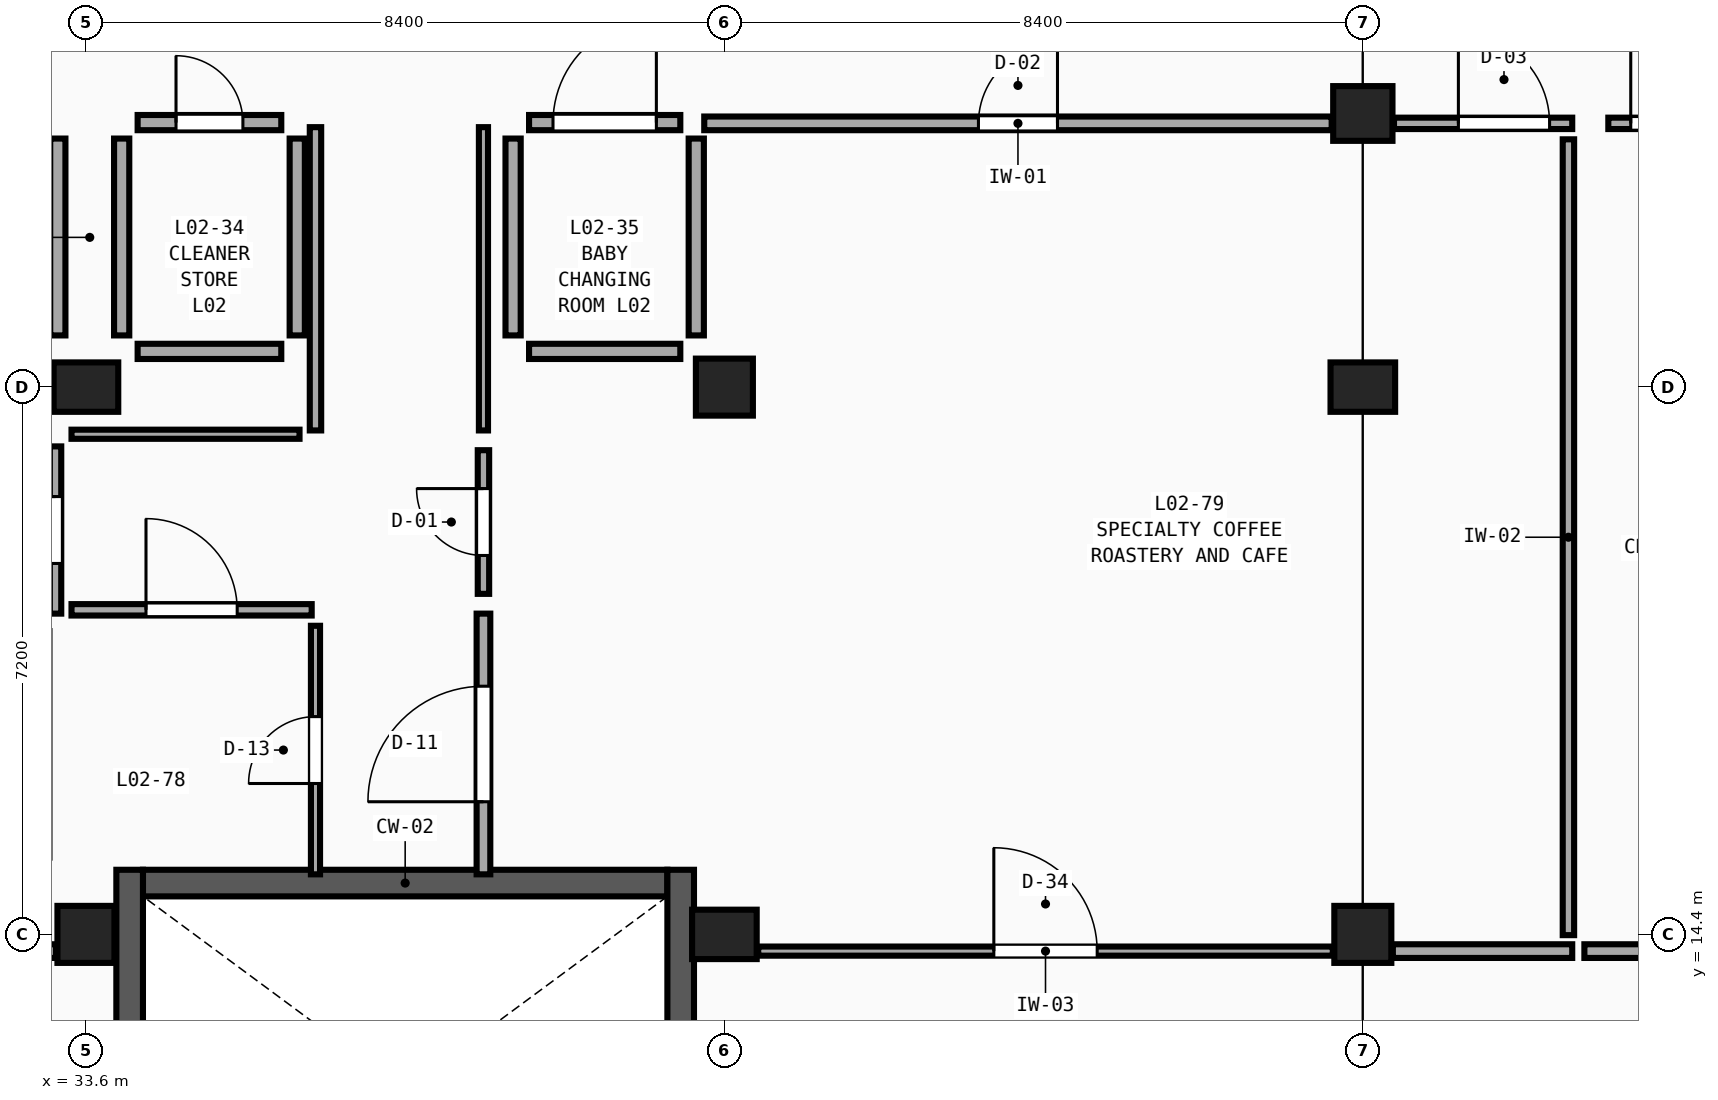
"""IFC4 building model, lengths in metres.
Left out: names, types, materials, properties, quantities, classifications, styles, units other than length and angle.
Written with IfcOpenShell. Run it as: python <this file> out.ifc"""

import sys

from ifc_helpers import new_model, si_unit, direction, frame, frame_2d, origin, origin_2d, place, context, subcontext, project, spatial, rectangle, extrude, element, fill, save


model = new_model("IFC4")
c1 = context("Model", 3, precision=1e-05, world=origin(), true_north=direction((0.0, 1.0)))
c2 = subcontext(c1, "Body", "Model", "MODEL_VIEW")
j1 = project(units=[si_unit("LENGTHUNIT", "METRE"), si_unit("PLANEANGLEUNIT", "RADIAN")], contexts=[c1])
p1 = place(None, origin())
s1 = spatial("IfcSite", under=j1, at=p1, CompositionType="ELEMENT")
p2 = place(p1, origin())
s2 = spatial("IfcBuilding", under=s1, at=p2, CompositionType="ELEMENT")
p3 = place(p2, frame((0.0, 0.0, 9.9)))
s3 = spatial("IfcBuildingStorey", under=s2, at=p3, CompositionType="ELEMENT", Elevation=9.9)
p4 = place(p3, frame((33.6, 14.4, 0.0), z_axis=(0.0, 0.0, 1.0), x_axis=(1.0, 0.0, 0.0)))
e1 = element("IfcColumn", 1, at=p4, inside=s3, PredefinedType="COLUMN", context=c2, shape_type="SweptSolid", body=[
    extrude(rectangle(XDim=0.75, YDim=0.75, at=origin_2d()), origin(), (0.0, 0.0, 1.0), 4.5),
])
for number, where, z_axis, x_axis in (
    (2, (33.6, 21.6, 0.0), (0.0, 0.0, 1.0), (1.0, 0.0, 0.0)),
    (3, (42.0, 14.4, 0.0), (0.0, 0.0, 1.0), (1.0, 0.0, 0.0)),
):
    element("IfcColumn", number, at=place(p3, frame(where, z_axis=z_axis, x_axis=x_axis)), inside=s3, PredefinedType="COLUMN", context=c2, shape_type="SweptSolid", body=[
        extrude(rectangle(XDim=0.85, YDim=0.65, at=origin_2d()), origin(), (0.0, 0.0, 1.0), 4.5),
    ])
for number, where, z_axis, x_axis in (
    (4, (42.0, 21.6, 0.0), (0.0, 0.0, 1.0), (1.0, 0.0, 0.0)),
    (5, (50.4, 14.4, 0.0), (0.0, 0.0, 1.0), (1.0, 0.0, 0.0)),
):
    element("IfcColumn", number, at=place(p3, frame(where, z_axis=z_axis, x_axis=x_axis)), inside=s3, PredefinedType="COLUMN", context=c2, shape_type="SweptSolid", body=[
        extrude(rectangle(XDim=0.75, YDim=0.75, at=origin_2d()), origin(), (0.0, 0.0, 1.0), 4.5),
    ])
p5 = place(p3, frame((50.4, 21.6, 0.0), z_axis=(0.0, 0.0, 1.0), x_axis=(1.0, 0.0, 0.0)))
e6 = element("IfcColumn", 6, at=p5, inside=s3, PredefinedType="COLUMN", context=c2, shape_type="SweptSolid", body=[
    extrude(rectangle(XDim=0.85, YDim=0.65, at=origin_2d()), origin(), (0.0, 0.0, 1.0), 4.5),
])
p6 = place(p3, frame((50.4, 25.2, 0.0), z_axis=(0.0, 0.0, 1.0), x_axis=(1.0, 0.0, 0.0)))
e7 = element("IfcColumn", 7, at=p6, inside=s3, PredefinedType="PILASTER", context=c2, shape_type="SweptSolid", body=[
    extrude(rectangle(XDim=0.78, YDim=0.72, at=origin_2d()), origin(), (0.0, 0.0, 1.0), 4.5),
])
p7 = place(p3, frame((34.35, 15.075, 0.0), z_axis=(0.0, 0.0, 1.0), x_axis=(1.0, 0.0, 0.0)))
e8 = element("IfcWall", 8, at=p7, inside=s3, PredefinedType="SHEAR", context=c2, shape_type="SweptSolid", body=[
    extrude(rectangle(XDim=6.9, YDim=0.35, at=frame_2d((3.45, 0.0))), origin(), (0.0, 0.0, 1.0), 4.5),
])
for number, where, z_axis, x_axis in (
    (9, (34.175, 15.25, 0.0), (0.0, 0.0, 1.0), (0.0, -1.0, 0.0)),
    (10, (41.425, 7.3, 0.0), (0.0, 0.0, 1.0), (0.0, 1.0, 0.0)),
):
    element("IfcWall", number, at=place(p3, frame(where, z_axis=z_axis, x_axis=x_axis)), inside=s3, PredefinedType="SHEAR", context=c2, shape_type="SweptSolid", body=[
        extrude(rectangle(XDim=7.95, YDim=0.35, at=frame_2d((3.975, 0.0))), origin(), (0.0, 0.0, 1.0), 4.5),
    ])
p8 = place(p3, frame((25.645, 14.18, 0.0), z_axis=(0.0, 0.0, 1.0), x_axis=(1.0, 0.0, 0.0)))
e11 = element("IfcWall", 11, at=p8, inside=s3, PredefinedType="PARTITIONING", context=c2, shape_type="SweptSolid", body=[
    extrude(rectangle(XDim=7.56, YDim=0.18, at=frame_2d((3.78, 0.0))), origin(), (0.0, 0.0, 1.0), 3.73),
])
p9 = place(p8, frame((3.26, 0.0, 0.0)))
e12 = element("IfcOpeningElement", 12, at=p9, cuts=e11, PredefinedType="OPENING", context=c2, shape_type="SweptSolid", body=[
    extrude(rectangle(XDim=1.04, YDim=2.37, at=frame_2d((0.52, 1.185))), frame((0.0, 0.11, 0.0), z_axis=(0.0, -1.0, 0.0), x_axis=(1.0, 0.0, 0.0)), (0.0, 0.0, 1.0), 0.22),
])
p10 = place(p3, frame((42.445, 14.18, 0.0), z_axis=(0.0, 0.0, 1.0), x_axis=(1.0, 0.0, 0.0)))
e13 = element("IfcWall", 13, at=p10, inside=s3, PredefinedType="PARTITIONING", context=c2, shape_type="SweptSolid", body=[
    extrude(rectangle(XDim=7.56, YDim=0.12, at=frame_2d((3.78, 0.0))), origin(), (0.0, 0.0, 1.0), 3.73),
])
p11 = place(p10, frame((3.1, 0.0, 0.0)))
e14 = element("IfcOpeningElement", 14, at=p11, cuts=e13, PredefinedType="OPENING", context=c2, shape_type="SweptSolid", body=[
    extrude(rectangle(XDim=1.36, YDim=2.45, at=frame_2d((0.68, 1.225))), frame((0.0, 0.08, 0.0), z_axis=(0.0, -1.0, 0.0), x_axis=(1.0, 0.0, 0.0)), (0.0, 0.0, 1.0), 0.16),
])
p12 = place(p3, frame((50.795, 14.18, 0.0), z_axis=(0.0, 0.0, 1.0), x_axis=(1.0, 0.0, 0.0)))
e15 = element("IfcWall", 15, at=p12, inside=s3, PredefinedType="PARTITIONING", context=c2, shape_type="SweptSolid", body=[
    extrude(rectangle(XDim=2.36, YDim=0.18, at=frame_2d((1.18, 0.0))), origin(), (0.0, 0.0, 1.0), 3.73),
])
p13 = place(p3, frame((41.735, 25.07, 0.0), z_axis=(0.0, 0.0, 1.0), x_axis=(1.0, 0.0, 0.0)))
e16 = element("IfcWall", 16, at=p13, inside=s3, PredefinedType="PARTITIONING", context=c2, shape_type="SweptSolid", body=[
    extrude(rectangle(XDim=8.255, YDim=0.18, at=frame_2d((4.127, 0.0))), origin(), (0.0, 0.0, 1.0), 4.18),
])
p14 = place(p13, frame((3.607, 0.0, 0.0)))
e17 = element("IfcOpeningElement", 17, at=p14, cuts=e16, PredefinedType="OPENING", context=c2, shape_type="SweptSolid", body=[
    extrude(rectangle(XDim=1.04, YDim=2.05, at=frame_2d((0.52, 1.025))), frame((0.0, 0.11, 0.0), z_axis=(0.0, -1.0, 0.0), x_axis=(1.0, 0.0, 0.0)), (0.0, 0.0, 1.0), 0.22),
])
p15 = place(p3, frame((50.81, 25.07, 0.0), z_axis=(0.0, 0.0, 1.0), x_axis=(1.0, 0.0, 0.0)))
e18 = element("IfcWall", 18, at=p15, inside=s3, PredefinedType="PARTITIONING", context=c2, shape_type="SweptSolid", body=[
    extrude(rectangle(XDim=2.345, YDim=0.15, at=frame_2d((1.172, 0.0))), origin(), (0.0, 0.0, 1.0), 4.18),
])
p16 = place(p15, frame((0.847, 0.0, 0.0)))
e19 = element("IfcOpeningElement", 19, at=p16, cuts=e18, PredefinedType="OPENING", context=c2, shape_type="SweptSolid", body=[
    extrude(rectangle(XDim=1.2, YDim=2.05, at=frame_2d((0.6, 1.025))), frame((0.0, 0.095, 0.0), z_axis=(0.0, -1.0, 0.0), x_axis=(1.0, 0.0, 0.0)), (0.0, 0.0, 1.0), 0.19),
])
p17 = place(p3, frame((53.315, 14.18, 0.0), z_axis=(0.0, 0.0, 1.0), x_axis=(1.0, 0.0, 0.0)))
e20 = element("IfcWall", 20, at=p17, inside=s3, PredefinedType="PARTITIONING", context=c2, shape_type="SweptSolid", body=[
    extrude(rectangle(XDim=5.09, YDim=0.18, at=frame_2d((2.545, 0.0))), origin(), (0.0, 0.0, 1.0), 3.73),
])
p18 = place(p17, frame((1.785, 0.0, 0.0)))
e21 = element("IfcOpeningElement", 21, at=p18, cuts=e20, PredefinedType="OPENING", context=c2, shape_type="SweptSolid", body=[
    extrude(rectangle(XDim=1.52, YDim=2.45, at=frame_2d((0.76, 1.225))), frame((0.0, 0.11, 0.0), z_axis=(0.0, -1.0, 0.0), x_axis=(1.0, 0.0, 0.0)), (0.0, 0.0, 1.0), 0.22),
])
p19 = place(p3, frame((36.62, 21.03, 0.0), z_axis=(0.0, 0.0, 1.0), x_axis=(0.0, 1.0, 0.0)))
e22 = element("IfcWall", 22, at=p19, inside=s3, PredefinedType="PARTITIONING", context=c2, shape_type="SweptSolid", body=[
    extrude(rectangle(XDim=3.99, YDim=0.15, at=frame_2d((1.995, 0.0))), origin(), (0.0, 0.0, 1.0), 4.18),
])
p20 = place(p3, frame((38.83, 21.03, 0.0), z_axis=(0.0, 0.0, 1.0), x_axis=(0.0, 1.0, 0.0)))
e23 = element("IfcWall", 23, at=p20, inside=s3, PredefinedType="PARTITIONING", context=c2, shape_type="SweptSolid", body=[
    extrude(rectangle(XDim=3.99, YDim=0.12, at=frame_2d((1.995, 0.0))), origin(), (0.0, 0.0, 1.0), 4.18),
])
p21 = place(p3, frame((38.83, 15.19, 0.0), z_axis=(0.0, 0.0, 1.0), x_axis=(0.0, 1.0, 0.0)))
e24 = element("IfcWall", 24, at=p21, inside=s3, PredefinedType="PARTITIONING", context=c2, shape_type="SweptSolid", body=[
    extrude(rectangle(XDim=3.43, YDim=0.18, at=frame_2d((1.715, 0.0))), origin(), (0.0, 0.0, 1.0), 4.18),
])
p22 = place(p21, frame((0.955, 0.0, 0.0)))
e25 = element("IfcOpeningElement", 25, at=p22, cuts=e24, PredefinedType="OPENING", context=c2, shape_type="SweptSolid", body=[
    extrude(rectangle(XDim=1.52, YDim=2.13, at=frame_2d((0.76, 1.065))), frame((0.0, 0.11, 0.0), z_axis=(0.0, -1.0, 0.0), x_axis=(1.0, 0.0, 0.0)), (0.0, 0.0, 1.0), 0.22),
])
p23 = place(p3, frame((36.62, 15.19, 0.0), z_axis=(0.0, 0.0, 1.0), x_axis=(0.0, 1.0, 0.0)))
e26 = element("IfcWall", 26, at=p23, inside=s3, PredefinedType="PARTITIONING", context=c2, shape_type="SweptSolid", body=[
    extrude(rectangle(XDim=3.27, YDim=0.12, at=frame_2d((1.635, 0.0))), origin(), (0.0, 0.0, 1.0), 4.18),
])
p24 = place(p23, frame((1.195, 0.0, 0.0)))
e27 = element("IfcOpeningElement", 27, at=p24, cuts=e26, PredefinedType="OPENING", context=c2, shape_type="SweptSolid", body=[
    extrude(rectangle(XDim=0.88, YDim=2.21, at=frame_2d((0.44, 1.105))), frame((0.0, 0.08, 0.0), z_axis=(0.0, -1.0, 0.0), x_axis=(1.0, 0.0, 0.0)), (0.0, 0.0, 1.0), 0.16),
])
p25 = place(p3, frame((33.41, 18.67, 0.0), z_axis=(0.0, 0.0, 1.0), x_axis=(1.0, 0.0, 0.0)))
e28 = element("IfcWall", 28, at=p25, inside=s3, PredefinedType="PARTITIONING", context=c2, shape_type="SweptSolid", body=[
    extrude(rectangle(XDim=3.16, YDim=0.15, at=frame_2d((1.58, 0.0))), origin(), (0.0, 0.0, 1.0), 4.18),
])
p26 = place(p25, frame((0.98, 0.0, 0.0)))
e29 = element("IfcOpeningElement", 29, at=p26, cuts=e28, PredefinedType="OPENING", context=c2, shape_type="SweptSolid", body=[
    extrude(rectangle(XDim=1.2, YDim=2.21, at=frame_2d((0.6, 1.105))), frame((0.0, 0.095, 0.0), z_axis=(0.0, -1.0, 0.0), x_axis=(1.0, 0.0, 0.0)), (0.0, 0.0, 1.0), 0.19),
])
p27 = place(p3, frame((33.41, 20.98, 0.0), z_axis=(0.0, 0.0, 1.0), x_axis=(1.0, 0.0, 0.0)))
e30 = element("IfcWall", 30, at=p27, inside=s3, PredefinedType="PARTITIONING", context=c2, shape_type="SweptSolid", body=[
    extrude(rectangle(XDim=3.0, YDim=0.12, at=frame_2d((1.5, 0.0))), origin(), (0.0, 0.0, 1.0), 3.73),
])
p28 = place(p3, frame((33.2, 18.62, 0.0), z_axis=(0.0, 0.0, 1.0), x_axis=(0.0, 1.0, 0.0)))
e31 = element("IfcWall", 31, at=p28, inside=s3, PredefinedType="PARTITIONING", context=c2, shape_type="SweptSolid", body=[
    extrude(rectangle(XDim=2.2, YDim=0.15, at=frame_2d((1.1, 0.0))), origin(), (0.0, 0.0, 1.0), 3.73),
])
p29 = place(p28, frame((0.66, 0.0, 0.0)))
e32 = element("IfcOpeningElement", 32, at=p29, cuts=e31, PredefinedType="OPENING", context=c2, shape_type="SweptSolid", body=[
    extrude(rectangle(XDim=0.88, YDim=2.05, at=frame_2d((0.44, 1.025))), frame((0.0, 0.095, 0.0), z_axis=(0.0, -1.0, 0.0), x_axis=(1.0, 0.0, 0.0)), (0.0, 0.0, 1.0), 0.19),
])
p30 = place(p3, frame((39.43, 25.08, 0.0), z_axis=(0.0, 0.0, 1.0), x_axis=(1.0, 0.0, 0.0)))
e33 = element("IfcWall", 33, at=p30, inside=s3, PredefinedType="PLUMBINGWALL", context=c2, shape_type="SweptSolid", body=[
    extrude(rectangle(XDim=1.99, YDim=0.2, at=frame_2d((0.995, 0.0))), origin(), (0.0, 0.0, 1.0), 4.18),
])
p31 = place(p30, frame((0.315, 0.0, 0.0)))
e34 = element("IfcOpeningElement", 34, at=p31, cuts=e33, PredefinedType="OPENING", context=c2, shape_type="SweptSolid", body=[
    extrude(rectangle(XDim=1.36, YDim=2.13, at=frame_2d((0.68, 1.065))), frame((0.0, 0.12, 0.0), z_axis=(0.0, -1.0, 0.0), x_axis=(1.0, 0.0, 0.0)), (0.0, 0.0, 1.0), 0.24),
])
p32 = place(p3, frame((34.28, 25.08, 0.0), z_axis=(0.0, 0.0, 1.0), x_axis=(1.0, 0.0, 0.0)))
e35 = element("IfcWall", 35, at=p32, inside=s3, PredefinedType="PLUMBINGWALL", context=c2, shape_type="SweptSolid", body=[
    extrude(rectangle(XDim=1.89, YDim=0.2, at=frame_2d((0.945, 0.0))), origin(), (0.0, 0.0, 1.0), 4.18),
])
p33 = place(p32, frame((0.505, 0.0, 0.0)))
e36 = element("IfcOpeningElement", 36, at=p33, cuts=e35, PredefinedType="OPENING", context=c2, shape_type="SweptSolid", body=[
    extrude(rectangle(XDim=0.88, YDim=2.05, at=frame_2d((0.44, 1.025))), frame((0.0, 0.12, 0.0), z_axis=(0.0, -1.0, 0.0), x_axis=(1.0, 0.0, 0.0)), (0.0, 0.0, 1.0), 0.24),
])
p34 = place(p3, frame((38.83, 18.88, 0.0), z_axis=(0.0, 0.0, 1.0), x_axis=(0.0, 1.0, 0.0)))
e37 = element("IfcWall", 37, at=p34, inside=s3, PredefinedType="PARTITIONING", context=c2, shape_type="SweptSolid", body=[
    extrude(rectangle(XDim=1.89, YDim=0.15, at=frame_2d((0.945, 0.0))), origin(), (0.0, 0.0, 1.0), 4.18),
])
p35 = place(p34, frame((0.505, 0.0, 0.0)))
e38 = element("IfcOpeningElement", 38, at=p35, cuts=e37, PredefinedType="OPENING", context=c2, shape_type="SweptSolid", body=[
    extrude(rectangle(XDim=0.88, YDim=2.05, at=frame_2d((0.44, 1.025))), frame((0.0, 0.095, 0.0), z_axis=(0.0, -1.0, 0.0), x_axis=(1.0, 0.0, 0.0)), (0.0, 0.0, 1.0), 0.19),
])
p36 = place(p3, frame((53.63, 25.07, 0.0), z_axis=(0.0, 0.0, 1.0), x_axis=(1.0, 0.0, 0.0)))
e39 = element("IfcWall", 39, at=p36, inside=s3, PredefinedType="PARTITIONING", context=c2, shape_type="SweptSolid", body=[
    extrude(rectangle(XDim=1.79, YDim=0.15, at=frame_2d((0.895, 0.0))), origin(), (0.0, 0.0, 1.0), 4.18),
])
p37 = place(p36, frame((0.295, 0.0, 0.0)))
e40 = element("IfcOpeningElement", 40, at=p37, cuts=e39, PredefinedType="OPENING", context=c2, shape_type="SweptSolid", body=[
    extrude(rectangle(XDim=1.2, YDim=2.37, at=frame_2d((0.6, 1.185))), frame((0.0, 0.095, 0.0), z_axis=(0.0, -1.0, 0.0), x_axis=(1.0, 0.0, 0.0)), (0.0, 0.0, 1.0), 0.19),
])
p38 = place(p3, frame((53.105, 14.39, 0.0), z_axis=(0.0, 0.0, 1.0), x_axis=(0.0, 1.0, 0.0)))
e41 = element("IfcWall", 41, at=p38, inside=s3, PredefinedType="PARTITIONING", context=c2, shape_type="SweptSolid", body=[
    extrude(rectangle(XDim=10.47, YDim=0.15, at=frame_2d((5.235, 0.0))), origin(), (0.0, 0.0, 1.0), 4.18),
])
p39 = place(p3, frame((33.23, 22.28, 0.0), z_axis=(0.0, 0.0, 1.0), x_axis=(0.0, 1.0, 0.0)))
e42 = element("IfcWall", 42, at=p39, inside=s3, PredefinedType="PLUMBINGWALL", context=c2, shape_type="SweptSolid", body=[
    extrude(rectangle(XDim=2.59, YDim=0.2, at=frame_2d((1.295, 0.0))), origin(), (0.0, 0.0, 1.0), 3.73),
])
p40 = place(p3, frame((36.38, 22.28, 0.0), z_axis=(0.0, 0.0, 1.0), x_axis=(0.0, 1.0, 0.0)))
e43 = element("IfcWall", 43, at=p40, inside=s3, PredefinedType="PLUMBINGWALL", context=c2, shape_type="SweptSolid", body=[
    extrude(rectangle(XDim=2.59, YDim=0.2, at=frame_2d((1.295, 0.0))), origin(), (0.0, 0.0, 1.0), 4.18),
])
for number, where, z_axis, x_axis in (
    (44, (34.07, 22.28, 0.0), (0.0, 0.0, 1.0), (0.0, 1.0, 0.0)),
    (45, (41.63, 22.28, 0.0), (0.0, 0.0, 1.0), (0.0, 1.0, 0.0)),
):
    element("IfcWall", number, at=place(p3, frame(where, z_axis=z_axis, x_axis=x_axis)), inside=s3, PredefinedType="PLUMBINGWALL", context=c2, shape_type="SweptSolid", body=[
        extrude(rectangle(XDim=2.59, YDim=0.2, at=frame_2d((1.295, 0.0))), origin(), (0.0, 0.0, 1.0), 3.73),
    ])
p41 = place(p3, frame((39.22, 22.28, 0.0), z_axis=(0.0, 0.0, 1.0), x_axis=(0.0, 1.0, 0.0)))
e46 = element("IfcWall", 46, at=p41, inside=s3, PredefinedType="PLUMBINGWALL", context=c2, shape_type="SweptSolid", body=[
    extrude(rectangle(XDim=2.59, YDim=0.2, at=frame_2d((1.295, 0.0))), origin(), (0.0, 0.0, 1.0), 4.18),
])
p42 = place(p3, frame((39.43, 22.07, 0.0), z_axis=(0.0, 0.0, 1.0), x_axis=(1.0, 0.0, 0.0)))
e47 = element("IfcWall", 47, at=p42, inside=s3, PredefinedType="PLUMBINGWALL", context=c2, shape_type="SweptSolid", body=[
    extrude(rectangle(XDim=1.99, YDim=0.2, at=frame_2d((0.995, 0.0))), origin(), (0.0, 0.0, 1.0), 3.73),
])
p43 = place(p3, frame((34.28, 22.07, 0.0), z_axis=(0.0, 0.0, 1.0), x_axis=(1.0, 0.0, 0.0)))
e48 = element("IfcWall", 48, at=p43, inside=s3, PredefinedType="PLUMBINGWALL", context=c2, shape_type="SweptSolid", body=[
    extrude(rectangle(XDim=1.89, YDim=0.2, at=frame_2d((0.945, 0.0))), origin(), (0.0, 0.0, 1.0), 3.73),
])
p44 = place(p11, origin())
e49 = element("IfcDoor", 49, at=p44, inside=s3, OperationType="SINGLE_SWING_LEFT", PredefinedType="DOOR", context=c2, shape_type="SweptSolid", body=[
    extrude(rectangle(XDim=1.36, YDim=2.45, at=frame_2d((0.68, 1.225))), frame((0.0, 0.025, 0.0), z_axis=(0.0, -1.0, 0.0), x_axis=(1.0, 0.0, 0.0)), (0.0, 0.0, 1.0), 0.05),
])
fill(e14, e49)
p45 = place(p14, origin())
e50 = element("IfcDoor", 50, at=p45, inside=s3, OperationType="SINGLE_SWING_RIGHT", PredefinedType="DOOR", context=c2, shape_type="SweptSolid", body=[
    extrude(rectangle(XDim=1.04, YDim=2.05, at=frame_2d((0.52, 1.025))), frame((0.0, 0.025, 0.0), z_axis=(0.0, -1.0, 0.0), x_axis=(1.0, 0.0, 0.0)), (0.0, 0.0, 1.0), 0.05),
])
fill(e17, e50)
p46 = place(p16, origin())
e51 = element("IfcDoor", 51, at=p46, inside=s3, OperationType="SINGLE_SWING_LEFT", PredefinedType="DOOR", context=c2, shape_type="SweptSolid", body=[
    extrude(rectangle(XDim=1.2, YDim=2.05, at=frame_2d((0.6, 1.025))), frame((0.0, 0.025, 0.0), z_axis=(0.0, -1.0, 0.0), x_axis=(1.0, 0.0, 0.0)), (0.0, 0.0, 1.0), 0.05),
])
fill(e19, e51)
p47 = place(p22, origin())
e52 = element("IfcDoor", 52, at=p47, inside=s3, OperationType="SINGLE_SWING_LEFT", PredefinedType="DOOR", context=c2, shape_type="SweptSolid", body=[
    extrude(rectangle(XDim=1.52, YDim=2.13, at=frame_2d((0.76, 1.065))), frame((0.0, 0.025, 0.0), z_axis=(0.0, -1.0, 0.0), x_axis=(1.0, 0.0, 0.0)), (0.0, 0.0, 1.0), 0.05),
])
fill(e25, e52)
p48 = place(p24, origin())
e53 = element("IfcDoor", 53, at=p48, inside=s3, OperationType="SINGLE_SWING_LEFT", PredefinedType="DOOR", context=c2, shape_type="SweptSolid", body=[
    extrude(rectangle(XDim=0.88, YDim=2.21, at=frame_2d((0.44, 1.105))), frame((0.0, 0.025, 0.0), z_axis=(0.0, -1.0, 0.0), x_axis=(1.0, 0.0, 0.0)), (0.0, 0.0, 1.0), 0.05),
])
fill(e27, e53)
p49 = place(p26, origin())
e54 = element("IfcDoor", 54, at=p49, inside=s3, OperationType="SINGLE_SWING_LEFT", PredefinedType="DOOR", context=c2, shape_type="SweptSolid", body=[
    extrude(rectangle(XDim=1.2, YDim=2.21, at=frame_2d((0.6, 1.105))), frame((0.0, 0.025, 0.0), z_axis=(0.0, -1.0, 0.0), x_axis=(1.0, 0.0, 0.0)), (0.0, 0.0, 1.0), 0.05),
])
fill(e29, e54)
p50 = place(p31, origin())
e55 = element("IfcDoor", 55, at=p50, inside=s3, OperationType="SINGLE_SWING_RIGHT", PredefinedType="DOOR", context=c2, shape_type="SweptSolid", body=[
    extrude(rectangle(XDim=1.36, YDim=2.13, at=frame_2d((0.68, 1.065))), frame((0.0, 0.025, 0.0), z_axis=(0.0, -1.0, 0.0), x_axis=(1.0, 0.0, 0.0)), (0.0, 0.0, 1.0), 0.05),
])
fill(e34, e55)
p51 = place(p33, origin())
e56 = element("IfcDoor", 56, at=p51, inside=s3, OperationType="SINGLE_SWING_LEFT", PredefinedType="DOOR", context=c2, shape_type="SweptSolid", body=[
    extrude(rectangle(XDim=0.88, YDim=2.05, at=frame_2d((0.44, 1.025))), frame((0.0, 0.025, 0.0), z_axis=(0.0, -1.0, 0.0), x_axis=(1.0, 0.0, 0.0)), (0.0, 0.0, 1.0), 0.05),
])
fill(e36, e56)
p52 = place(p35, origin())
e57 = element("IfcDoor", 57, at=p52, inside=s3, OperationType="SINGLE_SWING_RIGHT", PredefinedType="DOOR", context=c2, shape_type="SweptSolid", body=[
    extrude(rectangle(XDim=0.88, YDim=2.05, at=frame_2d((0.44, 1.025))), frame((0.0, 0.025, 0.0), z_axis=(0.0, -1.0, 0.0), x_axis=(1.0, 0.0, 0.0)), (0.0, 0.0, 1.0), 0.05),
])
fill(e38, e57)
p53 = place(p37, origin())
e58 = element("IfcDoor", 58, at=p53, inside=s3, OperationType="SINGLE_SWING_LEFT", PredefinedType="DOOR", context=c2, shape_type="SweptSolid", body=[
    extrude(rectangle(XDim=1.2, YDim=2.37, at=frame_2d((0.6, 1.185))), frame((0.0, 0.025, 0.0), z_axis=(0.0, -1.0, 0.0), x_axis=(1.0, 0.0, 0.0)), (0.0, 0.0, 1.0), 0.05),
])
fill(e40, e58)
p54 = place(p29, origin())
e59 = element("IfcDoor", 59, at=p54, inside=s3, OperationType="SINGLE_SWING_RIGHT", PredefinedType="DOOR", context=c2, shape_type="SweptSolid", body=[
    extrude(rectangle(XDim=0.88, YDim=2.05, at=frame_2d((0.44, 1.025))), frame((0.0, 0.025, 0.0), z_axis=(0.0, -1.0, 0.0), x_axis=(1.0, 0.0, 0.0)), (0.0, 0.0, 1.0), 0.05),
])
fill(e32, e59)
save(model, sys.argv[1])
